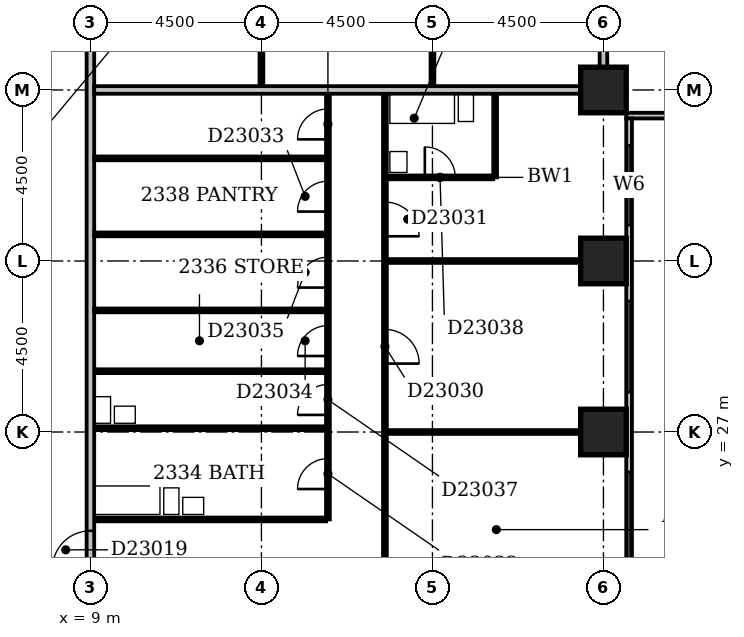
"""IFC4 building model, lengths in metres.
Left out: names, types, materials, properties, quantities, classifications, styles, units other than length and angle.
Written with IfcOpenShell. Run it as: python <this file> out.ifc"""

import sys

from ifc_helpers import new_model, si_unit, direction, frame, frame_2d, origin, origin_2d, place, context, subcontext, project, spatial, rectangle, extrude, element, fill, save


model = new_model("IFC4")
c1 = context("Model", 3, precision=1e-05, world=origin(), true_north=direction((0.0, 1.0)))
c2 = subcontext(c1, "Body", "Model", "MODEL_VIEW")
j1 = project(units=[si_unit("LENGTHUNIT", "METRE"), si_unit("PLANEANGLEUNIT", "RADIAN")], contexts=[c1])
p1 = place(None, origin())
s1 = spatial("IfcSite", under=j1, at=p1, CompositionType="ELEMENT")
p2 = place(p1, origin())
s2 = spatial("IfcBuilding", under=s1, at=p2, CompositionType="ELEMENT")
p3 = place(p2, frame((0.0, 0.0, 93.8)))
s3 = spatial("IfcBuildingStorey", under=s2, at=p3, CompositionType="ELEMENT", Elevation=93.8)
for number, where, z_axis, x_axis in (
    (1, (22.5, 27.0, -0.3), (0.0, 0.0, 1.0), (1.0, 0.0, 0.0)),
    (2, (22.5, 31.5, -0.3), (0.0, 0.0, 1.0), (1.0, 0.0, 0.0)),
    (3, (22.5, 36.0, -0.3), (0.0, 0.0, 1.0), (1.0, 0.0, 0.0)),
):
    element("IfcColumn", number, at=place(p3, frame(where, z_axis=z_axis, x_axis=x_axis)), inside=s3, PredefinedType="COLUMN", context=c2, shape_type="SweptSolid", body=[
        extrude(rectangle(XDim=1.2, YDim=1.2, at=origin_2d()), origin(), (0.0, 0.0, 1.0), 3.6),
    ])
p4 = place(p3, frame((23.175, 17.4, 0.0), z_axis=(0.0, 0.0, 1.0), x_axis=(0.0, 1.0, 0.0)))
e4 = element("IfcWall", 4, at=p4, inside=s3, PredefinedType="STANDARD", context=c2, shape_type="SweptSolid", body=[
    extrude(rectangle(XDim=17.85, YDim=0.15, at=frame_2d((8.925, 0.0))), origin(), (0.0, 0.0, 1.0), 2.7),
])
p5 = place(p4, frame((2.999, 0.0, 0.6)))
e5 = element("IfcOpeningElement", 5, at=p5, cuts=e4, PredefinedType="OPENING", context=c2, shape_type="SweptSolid", body=[
    extrude(rectangle(XDim=1.2, YDim=1.8, at=frame_2d((0.6, 0.9))), frame((0.0, 0.087, 0.0), z_axis=(0.0, -1.0, 0.0), x_axis=(1.0, 0.0, 0.0)), (0.0, 0.0, 1.0), 0.174),
])
p6 = place(p4, frame((6.15, 0.0, 0.6)))
e6 = element("IfcOpeningElement", 6, at=p6, cuts=e4, PredefinedType="OPENING", context=c2, shape_type="SweptSolid", body=[
    extrude(rectangle(XDim=2.4, YDim=1.8, at=frame_2d((1.2, 0.9))), frame((0.0, 0.087, 0.0), z_axis=(0.0, -1.0, 0.0), x_axis=(1.0, 0.0, 0.0)), (0.0, 0.0, 1.0), 0.174),
])
p7 = place(p4, frame((10.65, 0.0, 0.6)))
e7 = element("IfcOpeningElement", 7, at=p7, cuts=e4, PredefinedType="OPENING", context=c2, shape_type="SweptSolid", body=[
    extrude(rectangle(XDim=2.4, YDim=1.8, at=frame_2d((1.2, 0.9))), frame((0.0, 0.087, 0.0), z_axis=(0.0, -1.0, 0.0), x_axis=(1.0, 0.0, 0.0)), (0.0, 0.0, 1.0), 0.174),
])
p8 = place(p4, frame((15.043, 0.0, 0.6)))
e8 = element("IfcOpeningElement", 8, at=p8, cuts=e4, PredefinedType="OPENING", context=c2, shape_type="SweptSolid", body=[
    extrude(rectangle(XDim=2.1, YDim=1.8, at=frame_2d((1.05, 0.9))), frame((0.0, 0.087, 0.0), z_axis=(0.0, -1.0, 0.0), x_axis=(1.0, 0.0, 0.0)), (0.0, 0.0, 1.0), 0.174),
])
p9 = place(p3, frame((23.1, 35.325, 0.0), z_axis=(0.0, 0.0, 1.0), x_axis=(1.0, 0.0, 0.0)))
e9 = element("IfcWall", 9, at=p9, inside=s3, PredefinedType="STANDARD", context=c2, shape_type="SweptSolid", body=[
    extrude(rectangle(XDim=45.15, YDim=0.15, at=frame_2d((22.575, 0.0))), origin(), (0.0, 0.0, 1.0), 2.7),
])
p10 = place(p9, frame((2.185, 0.0, 0.6)))
e10 = element("IfcOpeningElement", 10, at=p10, cuts=e9, PredefinedType="OPENING", context=c2, shape_type="SweptSolid", body=[
    extrude(rectangle(XDim=0.9, YDim=1.8, at=frame_2d((0.45, 0.9))), frame((0.0, 0.087, 0.0), z_axis=(0.0, -1.0, 0.0), x_axis=(1.0, 0.0, 0.0)), (0.0, 0.0, 1.0), 0.174),
])
p11 = place(p9, frame((4.95, 0.0, 0.6)))
e11 = element("IfcOpeningElement", 11, at=p11, cuts=e9, PredefinedType="OPENING", context=c2, shape_type="SweptSolid", body=[
    extrude(rectangle(XDim=2.4, YDim=1.8, at=frame_2d((1.2, 0.9))), frame((0.0, 0.087, 0.0), z_axis=(0.0, -1.0, 0.0), x_axis=(1.0, 0.0, 0.0)), (0.0, 0.0, 1.0), 0.174),
])
p12 = place(p9, frame((9.45, 0.0, 0.6)))
e12 = element("IfcOpeningElement", 12, at=p12, cuts=e9, PredefinedType="OPENING", context=c2, shape_type="SweptSolid", body=[
    extrude(rectangle(XDim=2.4, YDim=1.8, at=frame_2d((1.2, 0.9))), frame((0.0, 0.087, 0.0), z_axis=(0.0, -1.0, 0.0), x_axis=(1.0, 0.0, 0.0)), (0.0, 0.0, 1.0), 0.174),
])
p13 = place(p9, frame((13.95, 0.0, 0.6)))
e13 = element("IfcOpeningElement", 13, at=p13, cuts=e9, PredefinedType="OPENING", context=c2, shape_type="SweptSolid", body=[
    extrude(rectangle(XDim=2.4, YDim=1.8, at=frame_2d((1.2, 0.9))), frame((0.0, 0.087, 0.0), z_axis=(0.0, -1.0, 0.0), x_axis=(1.0, 0.0, 0.0)), (0.0, 0.0, 1.0), 0.174),
])
p14 = place(p9, frame((18.45, 0.0, 0.6)))
e14 = element("IfcOpeningElement", 14, at=p14, cuts=e9, PredefinedType="OPENING", context=c2, shape_type="SweptSolid", body=[
    extrude(rectangle(XDim=2.4, YDim=1.8, at=frame_2d((1.2, 0.9))), frame((0.0, 0.087, 0.0), z_axis=(0.0, -1.0, 0.0), x_axis=(1.0, 0.0, 0.0)), (0.0, 0.0, 1.0), 0.174),
])
p15 = place(p9, frame((22.71, 0.0, 0.6)))
e15 = element("IfcOpeningElement", 15, at=p15, cuts=e9, PredefinedType="OPENING", context=c2, shape_type="SweptSolid", body=[
    extrude(rectangle(XDim=1.8, YDim=1.8, at=frame_2d((0.9, 0.9))), frame((0.0, 0.087, 0.0), z_axis=(0.0, -1.0, 0.0), x_axis=(1.0, 0.0, 0.0)), (0.0, 0.0, 1.0), 0.174),
])
p16 = place(p9, frame((28.859, 0.0, 0.6)))
e16 = element("IfcOpeningElement", 16, at=p16, cuts=e9, PredefinedType="OPENING", context=c2, shape_type="SweptSolid", body=[
    extrude(rectangle(XDim=1.2, YDim=1.8, at=frame_2d((0.6, 0.9))), frame((0.0, 0.087, 0.0), z_axis=(0.0, -1.0, 0.0), x_axis=(1.0, 0.0, 0.0)), (0.0, 0.0, 1.0), 0.174),
])
p17 = place(p9, frame((31.95, 0.0, 0.6)))
e17 = element("IfcOpeningElement", 17, at=p17, cuts=e9, PredefinedType="OPENING", context=c2, shape_type="SweptSolid", body=[
    extrude(rectangle(XDim=2.4, YDim=1.8, at=frame_2d((1.2, 0.9))), frame((0.0, 0.087, 0.0), z_axis=(0.0, -1.0, 0.0), x_axis=(1.0, 0.0, 0.0)), (0.0, 0.0, 1.0), 0.174),
])
p18 = place(p9, frame((36.45, 0.0, 0.6)))
e18 = element("IfcOpeningElement", 18, at=p18, cuts=e9, PredefinedType="OPENING", context=c2, shape_type="SweptSolid", body=[
    extrude(rectangle(XDim=2.4, YDim=1.8, at=frame_2d((1.2, 0.9))), frame((0.0, 0.087, 0.0), z_axis=(0.0, -1.0, 0.0), x_axis=(1.0, 0.0, 0.0)), (0.0, 0.0, 1.0), 0.174),
])
p19 = place(p9, frame((40.95, 0.0, 0.6)))
e19 = element("IfcOpeningElement", 19, at=p19, cuts=e9, PredefinedType="OPENING", context=c2, shape_type="SweptSolid", body=[
    extrude(rectangle(XDim=2.4, YDim=1.8, at=frame_2d((1.2, 0.9))), frame((0.0, 0.087, 0.0), z_axis=(0.0, -1.0, 0.0), x_axis=(1.0, 0.0, 0.0)), (0.0, 0.0, 1.0), 0.174),
])
p20 = place(p3, frame((9.0, 5.0, 0.0), z_axis=(0.0, 0.0, 1.0), x_axis=(0.0, 1.0, 0.0)))
e20 = element("IfcWall", 20, at=p20, inside=s3, PredefinedType="PARTITIONING", context=c2, shape_type="SweptSolid", body=[
    extrude(rectangle(XDim=44.5, YDim=0.2, at=frame_2d((22.25, 0.0))), origin(), (0.0, 0.0, 1.0), 3.3),
])
p21 = place(p20, frame((18.4, 0.0, 0.0)))
e21 = element("IfcOpeningElement", 21, at=p21, cuts=e20, PredefinedType="OPENING", context=c2, shape_type="SweptSolid", body=[
    extrude(rectangle(XDim=1.0, YDim=2.1, at=frame_2d((0.5, 1.05))), frame((0.0, 0.112, 0.0), z_axis=(0.0, -1.0, 0.0), x_axis=(1.0, 0.0, 0.0)), (0.0, 0.0, 1.0), 0.224),
])
p22 = place(p20, frame((11.7, 0.0, 0.0)))
e22 = element("IfcOpeningElement", 22, at=p22, cuts=e20, PredefinedType="OPENING", context=c2, shape_type="SweptSolid", body=[
    extrude(rectangle(XDim=1.0, YDim=2.1, at=frame_2d((0.5, 1.05))), frame((0.0, 0.112, 0.0), z_axis=(0.0, -1.0, 0.0), x_axis=(1.0, 0.0, 0.0)), (0.0, 0.0, 1.0), 0.224),
])
p23 = place(p20, frame((37.25, 0.0, 0.0)))
e23 = element("IfcOpeningElement", 23, at=p23, cuts=e20, PredefinedType="OPENING", context=c2, shape_type="SweptSolid", body=[
    extrude(rectangle(XDim=0.9, YDim=2.1, at=frame_2d((0.45, 1.05))), frame((0.0, 0.112, 0.0), z_axis=(0.0, -1.0, 0.0), x_axis=(1.0, 0.0, 0.0)), (0.0, 0.0, 1.0), 0.224),
])
p24 = place(p20, frame((1.5, 0.0, 0.0)))
e24 = element("IfcOpeningElement", 24, at=p24, cuts=e20, PredefinedType="OPENING", context=c2, shape_type="SweptSolid", body=[
    extrude(rectangle(XDim=0.9, YDim=2.1, at=frame_2d((0.45, 1.05))), frame((0.0, 0.112, 0.0), z_axis=(0.0, -1.0, 0.0), x_axis=(1.0, 0.0, 0.0)), (0.0, 0.0, 1.0), 0.224),
])
p25 = place(p3, frame((16.75, 18.1, 0.0), z_axis=(0.0, 0.0, 1.0), x_axis=(0.0, 1.0, 0.0)))
e25 = element("IfcWall", 25, at=p25, inside=s3, PredefinedType="PARTITIONING", context=c2, shape_type="SweptSolid", body=[
    extrude(rectangle(XDim=17.8, YDim=0.1, at=frame_2d((8.9, 0.0))), origin(), (0.0, 0.0, 1.0), 3.3),
])
p26 = place(p25, frame((3.9, 0.0, 0.0)))
e26 = element("IfcOpeningElement", 26, at=p26, cuts=e25, PredefinedType="OPENING", context=c2, shape_type="SweptSolid", body=[
    extrude(rectangle(XDim=0.9, YDim=2.1, at=frame_2d((0.45, 1.05))), frame((0.0, 0.062, 0.0), z_axis=(0.0, -1.0, 0.0), x_axis=(1.0, 0.0, 0.0)), (0.0, 0.0, 1.0), 0.124),
])
p27 = place(p25, frame((10.7, 0.0, 0.0)))
e27 = element("IfcOpeningElement", 27, at=p27, cuts=e25, PredefinedType="OPENING", context=c2, shape_type="SweptSolid", body=[
    extrude(rectangle(XDim=0.9, YDim=2.1, at=frame_2d((0.45, 1.05))), frame((0.0, 0.062, 0.0), z_axis=(0.0, -1.0, 0.0), x_axis=(1.0, 0.0, 0.0)), (0.0, 0.0, 1.0), 0.124),
])
p28 = place(p25, frame((14.05, 0.0, 0.0)))
e28 = element("IfcOpeningElement", 28, at=p28, cuts=e25, PredefinedType="OPENING", context=c2, shape_type="SweptSolid", body=[
    extrude(rectangle(XDim=0.9, YDim=2.1, at=frame_2d((0.45, 1.05))), frame((0.0, 0.062, 0.0), z_axis=(0.0, -1.0, 0.0), x_axis=(1.0, 0.0, 0.0)), (0.0, 0.0, 1.0), 0.124),
])
p29 = place(p3, frame((9.1, 24.7, 0.0), z_axis=(0.0, 0.0, 1.0), x_axis=(1.0, 0.0, 0.0)))
e29 = element("IfcWall", 29, at=p29, inside=s3, PredefinedType="PLUMBINGWALL", context=c2, shape_type="SweptSolid", body=[
    extrude(rectangle(XDim=6.1, YDim=0.1, at=frame_2d((3.05, 0.0))), origin(), (0.0, 0.0, 1.0), 3.3),
])
p30 = place(p3, frame((15.25, 24.7, 0.0), z_axis=(0.0, 0.0, 1.0), x_axis=(0.0, 1.0, 0.0)))
e30 = element("IfcWall", 30, at=p30, inside=s3, PredefinedType="PARTITIONING", context=c2, shape_type="SweptSolid", body=[
    extrude(rectangle(XDim=11.2, YDim=0.1, at=frame_2d((5.6, 0.0))), origin(), (0.0, 0.0, 1.0), 3.3),
])
p31 = place(p30, frame((0.8, 0.0, 0.0)))
e31 = element("IfcOpeningElement", 31, at=p31, cuts=e30, PredefinedType="OPENING", context=c2, shape_type="SweptSolid", body=[
    extrude(rectangle(XDim=0.8, YDim=2.1, at=frame_2d((0.4, 1.05))), frame((0.0, 0.062, 0.0), z_axis=(0.0, -1.0, 0.0), x_axis=(1.0, 0.0, 0.0)), (0.0, 0.0, 1.0), 0.124),
])
p32 = place(p30, frame((8.1, 0.0, 0.0)))
e32 = element("IfcOpeningElement", 32, at=p32, cuts=e30, PredefinedType="OPENING", context=c2, shape_type="SweptSolid", body=[
    extrude(rectangle(XDim=0.8, YDim=2.1, at=frame_2d((0.4, 1.05))), frame((0.0, 0.062, 0.0), z_axis=(0.0, -1.0, 0.0), x_axis=(1.0, 0.0, 0.0)), (0.0, 0.0, 1.0), 0.124),
])
p33 = place(p30, frame((4.3, 0.0, 0.0)))
e33 = element("IfcOpeningElement", 33, at=p33, cuts=e30, PredefinedType="OPENING", context=c2, shape_type="SweptSolid", body=[
    extrude(rectangle(XDim=0.8, YDim=2.1, at=frame_2d((0.4, 1.05))), frame((0.0, 0.062, 0.0), z_axis=(0.0, -1.0, 0.0), x_axis=(1.0, 0.0, 0.0)), (0.0, 0.0, 1.0), 0.124),
])
p34 = place(p30, frame((6.1, 0.0, 0.0)))
e34 = element("IfcOpeningElement", 34, at=p34, cuts=e30, PredefinedType="OPENING", context=c2, shape_type="SweptSolid", body=[
    extrude(rectangle(XDim=0.8, YDim=2.1, at=frame_2d((0.4, 1.05))), frame((0.0, 0.062, 0.0), z_axis=(0.0, -1.0, 0.0), x_axis=(1.0, 0.0, 0.0)), (0.0, 0.0, 1.0), 0.124),
])
p35 = place(p30, frame((10.0, 0.0, 0.0)))
e35 = element("IfcOpeningElement", 35, at=p35, cuts=e30, PredefinedType="OPENING", context=c2, shape_type="SweptSolid", body=[
    extrude(rectangle(XDim=0.8, YDim=2.1, at=frame_2d((0.4, 1.05))), frame((0.0, 0.062, 0.0), z_axis=(0.0, -1.0, 0.0), x_axis=(1.0, 0.0, 0.0)), (0.0, 0.0, 1.0), 0.124),
])
p36 = place(p30, frame((2.75, 0.0, 0.0)))
e36 = element("IfcOpeningElement", 36, at=p36, cuts=e30, PredefinedType="OPENING", context=c2, shape_type="SweptSolid", body=[
    extrude(rectangle(XDim=0.8, YDim=2.1, at=frame_2d((0.4, 1.05))), frame((0.0, 0.062, 0.0), z_axis=(0.0, -1.0, 0.0), x_axis=(1.0, 0.0, 0.0)), (0.0, 0.0, 1.0), 0.124),
])
p37 = place(p3, frame((16.8, 27.0, 0.0), z_axis=(0.0, 0.0, 1.0), x_axis=(1.0, 0.0, 0.0)))
e37 = element("IfcWall", 37, at=p37, inside=s3, PredefinedType="PARTITIONING", context=c2, shape_type="SweptSolid", body=[
    extrude(rectangle(XDim=5.1, YDim=0.1, at=frame_2d((2.55, 0.0))), origin(), (0.0, 0.0, 1.0), 2.7),
])
p38 = place(p3, frame((9.1, 27.1, 0.0), z_axis=(0.0, 0.0, 1.0), x_axis=(1.0, 0.0, 0.0)))
e38 = element("IfcWall", 38, at=p38, inside=s3, PredefinedType="PLUMBINGWALL", context=c2, shape_type="SweptSolid", body=[
    extrude(rectangle(XDim=6.1, YDim=0.1, at=frame_2d((3.05, 0.0))), origin(), (0.0, 0.0, 1.0), 2.7),
])
p39 = place(p3, frame((9.1, 28.6, 0.0), z_axis=(0.0, 0.0, 1.0), x_axis=(1.0, 0.0, 0.0)))
e39 = element("IfcWall", 39, at=p39, inside=s3, PredefinedType="PLUMBINGWALL", context=c2, shape_type="SweptSolid", body=[
    extrude(rectangle(XDim=6.1, YDim=0.1, at=frame_2d((3.05, 0.0))), origin(), (0.0, 0.0, 1.0), 3.3),
])
p40 = place(p3, frame((9.1, 30.2, 0.0), z_axis=(0.0, 0.0, 1.0), x_axis=(1.0, 0.0, 0.0)))
e40 = element("IfcWall", 40, at=p40, inside=s3, PredefinedType="PARTITIONING", context=c2, shape_type="SweptSolid", body=[
    extrude(rectangle(XDim=6.1, YDim=0.1, at=frame_2d((3.05, 0.0))), origin(), (0.0, 0.0, 1.0), 3.3),
])
p41 = place(p3, frame((16.8, 31.5, 0.0), z_axis=(0.0, 0.0, 1.0), x_axis=(1.0, 0.0, 0.0)))
e41 = element("IfcWall", 41, at=p41, inside=s3, PredefinedType="PARTITIONING", context=c2, shape_type="SweptSolid", body=[
    extrude(rectangle(XDim=5.1, YDim=0.1, at=frame_2d((2.55, 0.0))), origin(), (0.0, 0.0, 1.0), 3.3),
])
p42 = place(p3, frame((9.1, 32.2, 0.0), z_axis=(0.0, 0.0, 1.0), x_axis=(1.0, 0.0, 0.0)))
e42 = element("IfcWall", 42, at=p42, inside=s3, PredefinedType="PARTITIONING", context=c2, shape_type="SweptSolid", body=[
    extrude(rectangle(XDim=6.1, YDim=0.1, at=frame_2d((3.05, 0.0))), origin(), (0.0, 0.0, 1.0), 3.3),
])
p43 = place(p3, frame((16.8, 33.7, 0.0), z_axis=(0.0, 0.0, 1.0), x_axis=(1.0, 0.0, 0.0)))
e43 = element("IfcWall", 43, at=p43, inside=s3, PredefinedType="PLUMBINGWALL", context=c2, shape_type="SweptSolid", body=[
    extrude(rectangle(XDim=2.8, YDim=0.1, at=frame_2d((1.4, 0.0))), origin(), (0.0, 0.0, 1.0), 3.3),
])
p44 = place(p43, frame((1.0, 0.0, 0.0)))
e44 = element("IfcOpeningElement", 44, at=p44, cuts=e43, PredefinedType="OPENING", context=c2, shape_type="SweptSolid", body=[
    extrude(rectangle(XDim=0.8, YDim=2.1, at=frame_2d((0.4, 1.05))), frame((0.0, 0.062, 0.0), z_axis=(0.0, -1.0, 0.0), x_axis=(1.0, 0.0, 0.0)), (0.0, 0.0, 1.0), 0.124),
])
p45 = place(p3, frame((19.65, 33.7, 0.0), z_axis=(0.0, 0.0, 1.0), x_axis=(0.0, 1.0, 0.0)))
e45 = element("IfcWall", 45, at=p45, inside=s3, PredefinedType="PLUMBINGWALL", context=c2, shape_type="SweptSolid", body=[
    extrude(rectangle(XDim=2.2, YDim=0.1, at=frame_2d((1.1, 0.0))), origin(), (0.0, 0.0, 1.0), 3.3),
])
p46 = place(p3, frame((9.1, 34.2, 0.0), z_axis=(0.0, 0.0, 1.0), x_axis=(1.0, 0.0, 0.0)))
e46 = element("IfcWall", 46, at=p46, inside=s3, PredefinedType="PARTITIONING", context=c2, shape_type="SweptSolid", body=[
    extrude(rectangle(XDim=6.1, YDim=0.1, at=frame_2d((3.05, 0.0))), origin(), (0.0, 0.0, 1.0), 3.3),
])
p47 = place(p3, frame((9.1, 36.0, 0.0), z_axis=(0.0, 0.0, 1.0), x_axis=(1.0, 0.0, 0.0)))
e47 = element("IfcWall", 47, at=p47, inside=s3, PredefinedType="PARTITIONING", context=c2, shape_type="SweptSolid", body=[
    extrude(rectangle(XDim=12.8, YDim=0.2, at=frame_2d((6.4, 0.0))), origin(), (0.0, 0.0, 1.0), 2.4),
])
for number, where, z_axis, x_axis in (
    (48, (13.5, 36.1, 0.0), (0.0, 0.0, 1.0), (0.0, 1.0, 0.0)),
    (49, (18.0, 36.1, 0.0), (0.0, 0.0, 1.0), (0.0, 1.0, 0.0)),
):
    element("IfcWall", number, at=place(p3, frame(where, z_axis=z_axis, x_axis=x_axis)), inside=s3, PredefinedType="PARTITIONING", context=c2, shape_type="SweptSolid", body=[
        extrude(rectangle(XDim=13.3, YDim=0.1, at=frame_2d((6.65, 0.0))), origin(), (0.0, 0.0, 1.0), 3.3),
    ])
p48 = place(p3, frame((22.5, 36.6, 0.0), z_axis=(0.0, 0.0, 1.0), x_axis=(0.0, 1.0, 0.0)))
e50 = element("IfcWall", 50, at=p48, inside=s3, PredefinedType="PARTITIONING", context=c2, shape_type="SweptSolid", body=[
    extrude(rectangle(XDim=12.8, YDim=0.2, at=frame_2d((6.4, 0.0))), origin(), (0.0, 0.0, 1.0), 3.3),
])
p49 = place(p6, origin())
e51 = element("IfcWindow", 51, at=p49, inside=s3, PartitioningType="SINGLE_PANEL", PredefinedType="WINDOW", context=c2, shape_type="SweptSolid", body=[
    extrude(rectangle(XDim=2.4, YDim=1.8, at=frame_2d((1.2, 0.9))), frame((0.0, 0.03, 0.0), z_axis=(0.0, -1.0, 0.0), x_axis=(1.0, 0.0, 0.0)), (0.0, 0.0, 1.0), 0.06),
])
fill(e6, e51)
p50 = place(p7, origin())
e52 = element("IfcWindow", 52, at=p50, inside=s3, PartitioningType="SINGLE_PANEL", PredefinedType="WINDOW", context=c2, shape_type="SweptSolid", body=[
    extrude(rectangle(XDim=2.4, YDim=1.8, at=frame_2d((1.2, 0.9))), frame((0.0, 0.03, 0.0), z_axis=(0.0, -1.0, 0.0), x_axis=(1.0, 0.0, 0.0)), (0.0, 0.0, 1.0), 0.06),
])
fill(e7, e52)
p51 = place(p8, origin())
e53 = element("IfcWindow", 53, at=p51, inside=s3, PartitioningType="SINGLE_PANEL", PredefinedType="WINDOW", context=c2, shape_type="SweptSolid", body=[
    extrude(rectangle(XDim=2.1, YDim=1.8, at=frame_2d((1.05, 0.9))), frame((0.0, 0.03, 0.0), z_axis=(0.0, -1.0, 0.0), x_axis=(1.0, 0.0, 0.0)), (0.0, 0.0, 1.0), 0.06),
])
fill(e8, e53)
p52 = place(p21, origin())
e54 = element("IfcDoor", 54, at=p52, inside=s3, OperationType="SINGLE_SWING_LEFT", PredefinedType="DOOR", context=c2, shape_type="SweptSolid", body=[
    extrude(rectangle(XDim=1.0, YDim=2.1, at=frame_2d((0.5, 1.05))), frame((0.0, 0.025, 0.0), z_axis=(0.0, -1.0, 0.0), x_axis=(1.0, 0.0, 0.0)), (0.0, 0.0, 1.0), 0.05),
])
fill(e21, e54)
p53 = place(p27, frame((0.9, 0.0, 0.0), z_axis=(0.0, 0.0, 1.0), x_axis=(-1.0, 0.0, 0.0)))
e55 = element("IfcDoor", 55, at=p53, inside=s3, OperationType="SINGLE_SWING_RIGHT", PredefinedType="DOOR", context=c2, shape_type="SweptSolid", body=[
    extrude(rectangle(XDim=0.9, YDim=2.1, at=frame_2d((0.45, 1.05))), frame((0.0, 0.025, 0.0), z_axis=(0.0, -1.0, 0.0), x_axis=(1.0, 0.0, 0.0)), (0.0, 0.0, 1.0), 0.05),
])
fill(e27, e55)
p54 = place(p28, frame((0.9, 0.0, 0.0), z_axis=(0.0, 0.0, 1.0), x_axis=(-1.0, 0.0, 0.0)))
e56 = element("IfcDoor", 56, at=p54, inside=s3, OperationType="SINGLE_SWING_RIGHT", PredefinedType="DOOR", context=c2, shape_type="SweptSolid", body=[
    extrude(rectangle(XDim=0.9, YDim=2.1, at=frame_2d((0.45, 1.05))), frame((0.0, 0.025, 0.0), z_axis=(0.0, -1.0, 0.0), x_axis=(1.0, 0.0, 0.0)), (0.0, 0.0, 1.0), 0.05),
])
fill(e28, e56)
p55 = place(p31, origin())
e57 = element("IfcDoor", 57, at=p55, inside=s3, OperationType="SINGLE_SWING_LEFT", PredefinedType="DOOR", context=c2, shape_type="SweptSolid", body=[
    extrude(rectangle(XDim=0.8, YDim=2.1, at=frame_2d((0.4, 1.05))), frame((0.0, 0.025, 0.0), z_axis=(0.0, -1.0, 0.0), x_axis=(1.0, 0.0, 0.0)), (0.0, 0.0, 1.0), 0.05),
])
fill(e31, e57)
p56 = place(p32, origin())
e58 = element("IfcDoor", 58, at=p56, inside=s3, OperationType="SINGLE_SWING_LEFT", PredefinedType="DOOR", context=c2, shape_type="SweptSolid", body=[
    extrude(rectangle(XDim=0.8, YDim=2.1, at=frame_2d((0.4, 1.05))), frame((0.0, 0.025, 0.0), z_axis=(0.0, -1.0, 0.0), x_axis=(1.0, 0.0, 0.0)), (0.0, 0.0, 1.0), 0.05),
])
fill(e32, e58)
p57 = place(p33, origin())
e59 = element("IfcDoor", 59, at=p57, inside=s3, OperationType="SINGLE_SWING_LEFT", PredefinedType="DOOR", context=c2, shape_type="SweptSolid", body=[
    extrude(rectangle(XDim=0.8, YDim=2.1, at=frame_2d((0.4, 1.05))), frame((0.0, 0.025, 0.0), z_axis=(0.0, -1.0, 0.0), x_axis=(1.0, 0.0, 0.0)), (0.0, 0.0, 1.0), 0.05),
])
fill(e33, e59)
p58 = place(p34, origin())
e60 = element("IfcDoor", 60, at=p58, inside=s3, OperationType="SINGLE_SWING_LEFT", PredefinedType="DOOR", context=c2, shape_type="SweptSolid", body=[
    extrude(rectangle(XDim=0.8, YDim=2.1, at=frame_2d((0.4, 1.05))), frame((0.0, 0.025, 0.0), z_axis=(0.0, -1.0, 0.0), x_axis=(1.0, 0.0, 0.0)), (0.0, 0.0, 1.0), 0.05),
])
fill(e34, e60)
p59 = place(p35, origin())
e61 = element("IfcDoor", 61, at=p59, inside=s3, OperationType="SINGLE_SWING_LEFT", PredefinedType="DOOR", context=c2, shape_type="SweptSolid", body=[
    extrude(rectangle(XDim=0.8, YDim=2.1, at=frame_2d((0.4, 1.05))), frame((0.0, 0.025, 0.0), z_axis=(0.0, -1.0, 0.0), x_axis=(1.0, 0.0, 0.0)), (0.0, 0.0, 1.0), 0.05),
])
fill(e35, e61)
p60 = place(p36, origin())
e62 = element("IfcDoor", 62, at=p60, inside=s3, OperationType="SINGLE_SWING_LEFT", PredefinedType="DOOR", context=c2, shape_type="SweptSolid", body=[
    extrude(rectangle(XDim=0.8, YDim=2.1, at=frame_2d((0.4, 1.05))), frame((0.0, 0.025, 0.0), z_axis=(0.0, -1.0, 0.0), x_axis=(1.0, 0.0, 0.0)), (0.0, 0.0, 1.0), 0.05),
])
fill(e36, e62)
p61 = place(p44, origin())
e63 = element("IfcDoor", 63, at=p61, inside=s3, OperationType="SINGLE_SWING_LEFT", PredefinedType="DOOR", context=c2, shape_type="SweptSolid", body=[
    extrude(rectangle(XDim=0.8, YDim=2.1, at=frame_2d((0.4, 1.05))), frame((0.0, 0.025, 0.0), z_axis=(0.0, -1.0, 0.0), x_axis=(1.0, 0.0, 0.0)), (0.0, 0.0, 1.0), 0.05),
])
fill(e44, e63)
save(model, sys.argv[1])
